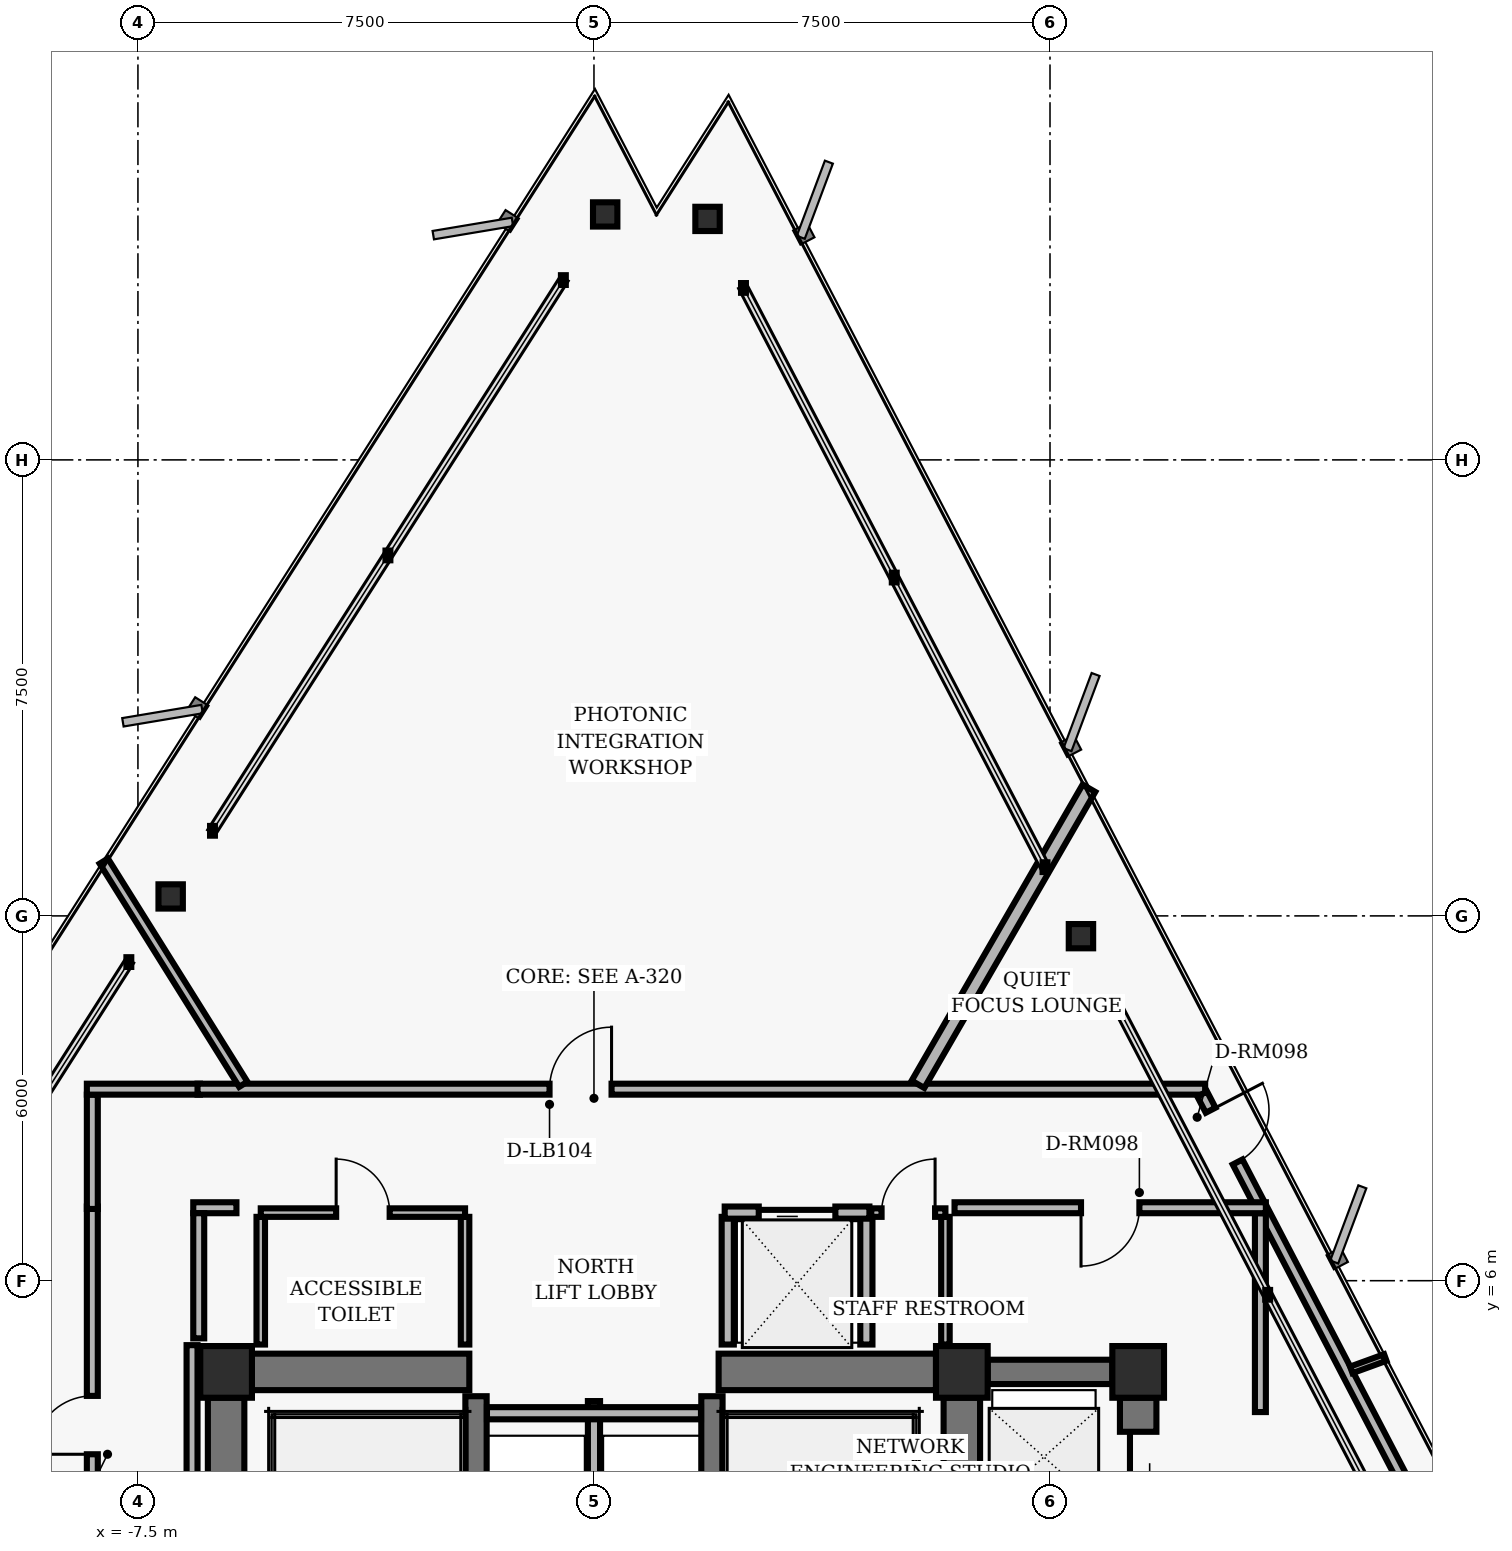
"""IFC4 building model, lengths in metres.
Left out: names, types, materials, properties, quantities, classifications, styles, units other than length and angle.
Written with IfcOpenShell. Run it as: python <this file> out.ifc"""

import sys

from ifc_helpers import new_model, si_unit, direction, frame, frame_2d, origin, origin_2d, place, context, subcontext, project, spatial, rectangle, hollow_rectangle, i_section, extrude, element, fill, save


model = new_model("IFC4")
c1 = context("Model", 3, precision=1e-05, world=origin(), true_north=direction((0.0, 1.0)))
c2 = subcontext(c1, "Body", "Model", "MODEL_VIEW")
j1 = project(units=[si_unit("LENGTHUNIT", "METRE"), si_unit("PLANEANGLEUNIT", "RADIAN")], contexts=[c1])
p1 = place(None, origin())
s1 = spatial("IfcSite", under=j1, at=p1, CompositionType="ELEMENT")
p2 = place(p1, origin())
s2 = spatial("IfcBuilding", under=s1, at=p2, CompositionType="ELEMENT")
p3 = place(p2, frame((0.0, 0.0, 138.08)))
s3 = spatial("IfcBuildingStorey", under=s2, at=p3, CompositionType="ELEMENT", Elevation=138.08)
for number, where, z_axis, x_axis in (
    (1, (-6.05, 4.5, 0.0), (0.0, 0.0, 1.0), (1.0, 0.0, 0.0)),
    (2, (6.05, 4.5, 0.0), (0.0, 0.0, 1.0), (1.0, 0.0, 0.0)),
    (3, (8.95, 4.5, 0.0), (0.0, 0.0, 1.0), (1.0, 0.0, 0.0)),
):
    element("IfcColumn", number, at=place(p3, frame(where, z_axis=z_axis, x_axis=x_axis)), inside=s3, PredefinedType="COLUMN", context=c2, shape_type="SweptSolid", body=[
        extrude(hollow_rectangle(XDim=0.85, YDim=0.85, WallThickness=0.055, InnerFilletRadius=0.02, OuterFilletRadius=0.04, at=origin_2d()), origin(), (0.0, 0.0, 1.0), 3.04),
    ])
for number, where, z_axis, x_axis in (
    (4, (-6.05, 0.425, 0.0), (0.0, 0.0, 1.0), (0.0, 1.0, 0.0)),
    (5, (6.05, 0.425, 0.0), (0.0, 0.0, 1.0), (0.0, 1.0, 0.0)),
):
    element("IfcWall", number, at=place(p3, frame(where, z_axis=z_axis, x_axis=x_axis)), inside=s3, PredefinedType="SHEAR", context=c2, shape_type="SweptSolid", body=[
        extrude(rectangle(XDim=3.65, YDim=0.6, at=frame_2d((1.825, 0.0))), origin(), (0.0, 0.0, 1.0), 2.788),
    ])
for number, where, z_axis, x_axis in (
    (6, (-1.94, -4.1, 0.0), (0.0, 0.0, 1.0), (0.0, 1.0, 0.0)),
    (7, (1.94, -4.1, 0.0), (0.0, 0.0, 1.0), (0.0, 1.0, 0.0)),
):
    element("IfcWall", number, at=place(p3, frame(where, z_axis=z_axis, x_axis=x_axis)), inside=s3, PredefinedType="SHEAR", context=c2, shape_type="SweptSolid", body=[
        extrude(rectangle(XDim=8.2, YDim=0.35, at=frame_2d((4.1, 0.0))), origin(), (0.0, 0.0, 1.0), 2.788),
    ])
for number, where, z_axis, x_axis in (
    (8, (-5.625, 4.5, 0.0), (0.0, 0.0, 1.0), (1.0, 0.0, 0.0)),
    (9, (2.05, 4.5, 0.0), (0.0, 0.0, 1.0), (1.0, 0.0, 0.0)),
):
    element("IfcWall", number, at=place(p3, frame(where, z_axis=z_axis, x_axis=x_axis)), inside=s3, PredefinedType="SHEAR", context=c2, shape_type="SweptSolid", body=[
        extrude(rectangle(XDim=3.575, YDim=0.6, at=frame_2d((1.788, 0.0))), origin(), (0.0, 0.0, 1.0), 2.788),
    ])
p4 = place(p3, frame((8.95, -3.875, 0.0), z_axis=(0.0, 0.0, 1.0), x_axis=(0.0, 1.0, 0.0)))
e10 = element("IfcWall", 10, at=p4, inside=s3, PredefinedType="SHEAR", context=c2, shape_type="SweptSolid", body=[
    extrude(rectangle(XDim=7.95, YDim=0.6, at=frame_2d((3.975, 0.0))), origin(), (0.0, 0.0, 1.0), 2.788),
])
p5 = place(p4, frame((0.55, 0.0, 0.0)))
e11 = element("IfcOpeningElement", 11, at=p5, cuts=e10, PredefinedType="OPENING", context=c2, shape_type="SweptSolid", body=[
    extrude(rectangle(XDim=1.06, YDim=2.04, at=frame_2d((0.53, 1.02))), frame((0.0, 0.31, 0.0), z_axis=(0.0, -1.0, 0.0), x_axis=(1.0, 0.0, 0.0)), (0.0, 0.0, 1.0), 0.62),
])
p6 = place(p4, frame((3.445, 0.0, 0.0)))
e12 = element("IfcOpeningElement", 12, at=p6, cuts=e10, PredefinedType="OPENING", context=c2, shape_type="SweptSolid", body=[
    extrude(rectangle(XDim=1.06, YDim=2.04, at=frame_2d((0.53, 1.02))), frame((0.0, 0.31, 0.0), z_axis=(0.0, -1.0, 0.0), x_axis=(1.0, 0.0, 0.0)), (0.0, 0.0, 1.0), 0.62),
])
p7 = place(p4, frame((6.33, 0.0, 0.0)))
e13 = element("IfcOpeningElement", 13, at=p7, cuts=e10, PredefinedType="OPENING", context=c2, shape_type="SweptSolid", body=[
    extrude(rectangle(XDim=1.06, YDim=2.04, at=frame_2d((0.53, 1.02))), frame((0.0, 0.31, 0.0), z_axis=(0.0, -1.0, 0.0), x_axis=(1.0, 0.0, 0.0)), (0.0, 0.0, 1.0), 0.62),
])
p8 = place(p3, frame((6.475, 4.5, 0.0), z_axis=(0.0, 0.0, 1.0), x_axis=(1.0, 0.0, 0.0)))
e14 = element("IfcWall", 14, at=p8, inside=s3, PredefinedType="SHEAR", context=c2, shape_type="SweptSolid", body=[
    extrude(rectangle(XDim=2.05, YDim=0.4, at=frame_2d((1.025, 0.0))), origin(), (0.0, 0.0, 1.0), 2.788),
])
for number, where, z_axis, x_axis in (
    (15, (8.009, 11.666, 0.0), (0.0, 0.0, 1.0), (1.0, 0.0, 0.0)),
    (16, (1.868, 23.463, 0.0), (0.0, 0.0, 1.0), (1.0, 0.0, 0.0)),
    (17, (0.184, 23.537, 0.0), (0.0, 0.0, 1.0), (1.0, 0.0, 0.0)),
    (18, (-6.962, 12.32, 0.0), (0.0, 0.0, 1.0), (1.0, 0.0, 0.0)),
):
    element("IfcColumn", number, at=place(p3, frame(where, z_axis=z_axis, x_axis=x_axis)), inside=s3, PredefinedType="COLUMN", context=c2, shape_type="SweptSolid", body=[
        extrude(i_section(OverallWidth=0.401, OverallDepth=0.399, WebThickness=0.025, FlangeThickness=0.04, FilletRadius=0.018, at=origin_2d()), origin(), (0.0, 0.0, 1.0), 3.04),
    ])
p9 = place(p3, frame((0.0, 1.25, 0.0), z_axis=(0.0, 0.0, 1.0), x_axis=(0.0, 1.0, 0.0)))
e19 = element("IfcWall", 19, at=p9, inside=s3, PredefinedType="PARTITIONING", context=c2, shape_type="SweptSolid", body=[
    extrude(rectangle(XDim=2.77, YDim=0.2, at=frame_2d((1.385, 0.0))), origin(), (0.0, 0.0, 1.0), 2.763),
])
p10 = place(p3, frame((-1.76, 3.82, 0.0), z_axis=(0.0, 0.0, 1.0), x_axis=(1.0, 0.0, 0.0)))
e20 = element("IfcWall", 20, at=p10, inside=s3, PredefinedType="PARTITIONING", context=c2, shape_type="SweptSolid", body=[
    extrude(rectangle(XDim=3.52, YDim=0.2, at=frame_2d((1.76, 0.0))), origin(), (0.0, 0.0, 1.0), 2.763),
])
for number, where, z_axis, x_axis in (
    (21, (2.2, 4.95, 0.0), (0.0, 0.0, 1.0), (0.0, 1.0, 0.0)),
    (22, (4.48, 4.95, 0.0), (0.0, 0.0, 1.0), (0.0, 1.0, 0.0)),
):
    element("IfcWall", number, at=place(p3, frame(where, z_axis=z_axis, x_axis=x_axis)), inside=s3, PredefinedType="PARTITIONING", context=c2, shape_type="SweptSolid", body=[
        extrude(rectangle(XDim=2.1, YDim=0.2, at=frame_2d((1.05, 0.0))), origin(), (0.0, 0.0, 1.0), 2.763),
    ])
p11 = place(p3, frame((2.15, 7.12, 0.0), z_axis=(0.0, 0.0, 1.0), x_axis=(1.0, 0.0, 0.0)))
e23 = element("IfcWall", 23, at=p11, inside=s3, PredefinedType="PARTITIONING", context=c2, shape_type="SweptSolid", body=[
    extrude(rectangle(XDim=2.38, YDim=0.2, at=frame_2d((1.19, 0.0))), origin(), (0.0, 0.0, 1.0), 2.763),
])
p12 = place(p11, frame((0.56, 0.0, 0.0)))
e24 = element("IfcOpeningElement", 24, at=p12, cuts=e23, PredefinedType="OPENING", context=c2, shape_type="SweptSolid", body=[
    extrude(rectangle(XDim=1.26, YDim=2.06, at=frame_2d((0.63, 1.03))), frame((0.0, 0.11, 0.0), z_axis=(0.0, -1.0, 0.0), x_axis=(1.0, 0.0, 0.0)), (0.0, 0.0, 1.0), 0.22),
])
for number, where, z_axis, x_axis in (
    (25, (-5.48, 4.95, 0.0), (0.0, 0.0, 1.0), (0.0, 1.0, 0.0)),
    (26, (-2.12, 4.95, 0.0), (0.0, 0.0, 1.0), (0.0, 1.0, 0.0)),
):
    element("IfcWall", number, at=place(p3, frame(where, z_axis=z_axis, x_axis=x_axis)), inside=s3, PredefinedType="PARTITIONING", context=c2, shape_type="SweptSolid", body=[
        extrude(rectangle(XDim=2.1, YDim=0.14, at=frame_2d((1.05, 0.0))), origin(), (0.0, 0.0, 1.0), 2.763),
    ])
p13 = place(p3, frame((-5.48, 7.12, 0.0), z_axis=(0.0, 0.0, 1.0), x_axis=(1.0, 0.0, 0.0)))
e27 = element("IfcWall", 27, at=p13, inside=s3, PredefinedType="PARTITIONING", context=c2, shape_type="SweptSolid", body=[
    extrude(rectangle(XDim=3.36, YDim=0.14, at=frame_2d((1.68, 0.0))), origin(), (0.0, 0.0, 1.0), 2.33),
])
p14 = place(p13, frame((1.24, 0.0, 0.0)))
e28 = element("IfcOpeningElement", 28, at=p14, cuts=e27, PredefinedType="OPENING", context=c2, shape_type="SweptSolid", body=[
    extrude(rectangle(XDim=0.88, YDim=2.02, at=frame_2d((0.44, 1.01))), frame((0.0, 0.08, 0.0), z_axis=(0.0, -1.0, 0.0), x_axis=(1.0, 0.0, 0.0)), (0.0, 0.0, 1.0), 0.16),
])
p15 = place(p3, frame((5.78, 4.95, 0.0), z_axis=(0.0, 0.0, 1.0), x_axis=(0.0, 1.0, 0.0)))
e29 = element("IfcWall", 29, at=p15, inside=s3, PredefinedType="PARTITIONING", context=c2, shape_type="SweptSolid", body=[
    extrude(rectangle(XDim=2.1, YDim=0.14, at=frame_2d((1.05, 0.0))), origin(), (0.0, 0.0, 1.0), 2.763),
])
p16 = place(p3, frame((4.56, 7.12, 0.0), z_axis=(0.0, 0.0, 1.0), x_axis=(1.0, 0.0, 0.0)))
e30 = element("IfcWall", 30, at=p16, inside=s3, PredefinedType="PARTITIONING", context=c2, shape_type="SweptSolid", body=[
    extrude(rectangle(XDim=1.22, YDim=0.14, at=frame_2d((0.61, 0.0))), origin(), (0.0, 0.0, 1.0), 2.763),
])
p17 = place(p16, frame((0.17, 0.0, 0.0)))
e31 = element("IfcOpeningElement", 31, at=p17, cuts=e30, PredefinedType="OPENING", context=c2, shape_type="SweptSolid", body=[
    extrude(rectangle(XDim=0.88, YDim=2.02, at=frame_2d((0.44, 1.01))), frame((0.0, 0.08, 0.0), z_axis=(0.0, -1.0, 0.0), x_axis=(1.0, 0.0, 0.0)), (0.0, 0.0, 1.0), 0.16),
])
p18 = place(p3, frame((-8.25, -7.22, 0.0), z_axis=(0.0, 0.0, 1.0), x_axis=(0.0, 1.0, 0.0)))
e32 = element("IfcWall", 32, at=p18, inside=s3, PredefinedType="PARTITIONING", context=c2, shape_type="SweptSolid", body=[
    extrude(rectangle(XDim=14.44, YDim=0.18, at=frame_2d((7.22, 0.0))), origin(), (0.0, 0.0, 1.0), 2.763),
])
p19 = place(p18, frame((3.406, 0.0, 0.0)))
e33 = element("IfcOpeningElement", 33, at=p19, cuts=e32, PredefinedType="OPENING", context=c2, shape_type="SweptSolid", body=[
    extrude(rectangle(XDim=0.96, YDim=2.02, at=frame_2d((0.48, 1.01))), frame((0.0, 0.1, 0.0), z_axis=(0.0, -1.0, 0.0), x_axis=(1.0, 0.0, 0.0)), (0.0, 0.0, 1.0), 0.2),
])
p20 = place(p18, frame((10.365, 0.0, 0.0)))
e34 = element("IfcOpeningElement", 34, at=p20, cuts=e32, PredefinedType="OPENING", context=c2, shape_type="SweptSolid", body=[
    extrude(rectangle(XDim=0.96, YDim=2.02, at=frame_2d((0.48, 1.01))), frame((0.0, 0.1, 0.0), z_axis=(0.0, -1.0, 0.0), x_axis=(1.0, 0.0, 0.0)), (0.0, 0.0, 1.0), 0.2),
])
p21 = place(p3, frame((-8.25, 7.18, 0.0), z_axis=(0.0, 0.0, 1.0), x_axis=(0.0, 1.0, 0.0)))
e35 = element("IfcWall", 35, at=p21, inside=s3, PredefinedType="PARTITIONING", context=c2, shape_type="SweptSolid", body=[
    extrude(rectangle(XDim=1.88, YDim=0.18, at=frame_2d((0.94, 0.0))), origin(), (0.0, 0.0, 1.0), 2.763),
])
p22 = place(p3, frame((-8.34, 9.15, 0.0), z_axis=(0.0, 0.0, 1.0), x_axis=(1.0, 0.0, 0.0)))
e36 = element("IfcWall", 36, at=p22, inside=s3, PredefinedType="PARTITIONING", context=c2, shape_type="SweptSolid", body=[
    extrude(rectangle(XDim=1.86, YDim=0.18, at=frame_2d((0.93, 0.0))), origin(), (0.0, 0.0, 1.0), 2.763),
])
p23 = place(p3, frame((-6.52, 9.15, 0.0), z_axis=(0.0, 0.0, 1.0), x_axis=(1.0, 0.0, 0.0)))
e37 = element("IfcWall", 37, at=p23, inside=s3, PredefinedType="PARTITIONING", context=c2, shape_type="SweptSolid", body=[
    extrude(rectangle(XDim=16.572, YDim=0.18, at=frame_2d((8.286, 0.0))), origin(), (0.0, 0.0, 1.0), 2.33),
])
p24 = place(p23, frame((5.789, 0.0, 0.0)))
e38 = element("IfcOpeningElement", 38, at=p24, cuts=e37, PredefinedType="OPENING", context=c2, shape_type="SweptSolid", body=[
    extrude(rectangle(XDim=1.02, YDim=2.02, at=frame_2d((0.51, 1.01))), frame((0.0, 0.1, 0.0), z_axis=(0.0, -1.0, 0.0), x_axis=(1.0, 0.0, 0.0)), (0.0, 0.0, 1.0), 0.2),
])
p25 = place(p3, frame((10.003, 9.07, 0.0), z_axis=(0.0, 0.0, 1.0), x_axis=(0.461740291408, -0.887015165198, 0.0)))
e39 = element("IfcWall", 39, at=p25, inside=s3, PredefinedType="PARTITIONING", context=c2, shape_type="SweptSolid", body=[
    extrude(rectangle(XDim=9.976, YDim=0.18, at=frame_2d((4.988, 0.0))), origin(), (0.0, 0.0, 1.0), 2.763),
])
p26 = place(p25, frame((0.301, 0.0, 0.0)))
e40 = element("IfcOpeningElement", 40, at=p26, cuts=e39, PredefinedType="OPENING", context=c2, shape_type="SweptSolid", body=[
    extrude(rectangle(XDim=0.96, YDim=2.02, at=frame_2d((0.48, 1.01))), frame((0.0, 0.1, 0.0), z_axis=(0.0, -1.0, 0.0), x_axis=(1.0, 0.0, 0.0)), (0.0, 0.0, 1.0), 0.2),
])
p27 = place(p3, frame((10.96, 3.84, 0.0), z_axis=(0.0, 0.0, 1.0), x_axis=(0.0, 1.0, 0.0)))
e41 = element("IfcWall", 41, at=p27, inside=s3, PredefinedType="PARTITIONING", context=c2, shape_type="SweptSolid", body=[
    extrude(rectangle(XDim=3.271, YDim=0.18, at=frame_2d((1.635, 0.0))), origin(), (0.0, 0.0, 1.0), 2.763),
])
p28 = place(p3, frame((11.05, 7.2, 0.0), z_axis=(0.0, 0.0, 1.0), x_axis=(-1.0, 0.0, 0.0)))
e42 = element("IfcWall", 42, at=p28, inside=s3, PredefinedType="PARTITIONING", context=c2, shape_type="SweptSolid", body=[
    extrude(rectangle(XDim=5.12, YDim=0.18, at=frame_2d((2.56, 0.0))), origin(), (0.0, 0.0, 1.0), 2.763),
])
p29 = place(p28, frame((2.08, 0.0, 0.0)))
e43 = element("IfcOpeningElement", 43, at=p29, cuts=e42, PredefinedType="OPENING", context=c2, shape_type="SweptSolid", body=[
    extrude(rectangle(XDim=0.96, YDim=2.02, at=frame_2d((0.48, 1.01))), frame((0.0, 0.1, 0.0), z_axis=(0.0, -1.0, 0.0), x_axis=(1.0, 0.0, 0.0)), (0.0, 0.0, 1.0), 0.2),
])
p30 = place(p3, frame((-5.88, 7.2, 0.0), z_axis=(0.0, 0.0, 1.0), x_axis=(-1.0, 0.0, 0.0)))
e44 = element("IfcWall", 44, at=p30, inside=s3, PredefinedType="PARTITIONING", context=c2, shape_type="SweptSolid", body=[
    extrude(rectangle(XDim=0.71, YDim=0.18, at=frame_2d((0.355, 0.0))), origin(), (0.0, 0.0, 1.0), 2.33),
])
p31 = place(p3, frame((-6.5, 7.11, 0.0), z_axis=(0.0, 0.0, 1.0), x_axis=(0.0, -1.0, 0.0)))
e45 = element("IfcWall", 45, at=p31, inside=s3, PredefinedType="PARTITIONING", context=c2, shape_type="SweptSolid", body=[
    extrude(rectangle(XDim=2.058, YDim=0.18, at=frame_2d((1.029, 0.0))), origin(), (0.0, 0.0, 1.0), 2.132),
])
p32 = place(p3, frame((-6.61, 4.94, 0.0), z_axis=(0.0, 0.0, 1.0), x_axis=(0.0, -1.0, 0.0)))
e46 = element("IfcWall", 46, at=p32, inside=s3, PredefinedType="PARTITIONING", context=c2, shape_type="SweptSolid", body=[
    extrude(rectangle(XDim=9.46, YDim=0.18, at=frame_2d((4.73, 0.0))), origin(), (0.0, 0.0, 1.0), 2.763),
])
p33 = place(p3, frame((12.455, 4.533, 0.0), z_axis=(0.0, 0.0, 1.0), x_axis=(0.93962558955, 0.342204254011, 0.0)))
e47 = element("IfcWall", 47, at=p33, inside=s3, PredefinedType="MOVABLE", context=c2, shape_type="SweptSolid", body=[
    extrude(rectangle(XDim=0.595, YDim=0.115, at=frame_2d((0.297, 0.0))), origin(), (0.0, 0.0, 1.0), 2.763),
])
p34 = place(p3, frame((5.329, 9.23, 0.0), z_axis=(0.0, 0.0, 1.0), x_axis=(0.500024387096, 0.86601132343, 0.0)))
e48 = element("IfcWall", 48, at=p34, inside=s3, PredefinedType="PARTITIONING", context=c2, shape_type="SweptSolid", body=[
    extrude(rectangle(XDim=5.623, YDim=0.24, at=frame_2d((2.812, 0.0))), origin(), (0.0, 0.0, 1.0), 2.763),
])
p35 = place(p3, frame((-5.768, 9.23, 0.0), z_axis=(0.0, 0.0, 1.0), x_axis=(-0.529887412725, 0.848067998356, 0.0)))
e49 = element("IfcWall", 49, at=p35, inside=s3, PredefinedType="PARTITIONING", context=c2, shape_type="SweptSolid", body=[
    extrude(rectangle(XDim=4.329, YDim=0.16, at=frame_2d((2.165, 0.0))), origin(), (0.0, 0.0, 1.0), 2.763),
])
p36 = place(p12, origin())
e50 = element("IfcDoor", 50, at=p36, inside=s3, OperationType="SLIDING_TO_LEFT", PredefinedType="DOOR", context=c2, shape_type="SweptSolid", body=[
    extrude(rectangle(XDim=1.26, YDim=2.06, at=frame_2d((0.63, 1.03))), frame((0.0, 0.025, 0.0), z_axis=(0.0, -1.0, 0.0), x_axis=(1.0, 0.0, 0.0)), (0.0, 0.0, 1.0), 0.05),
])
fill(e24, e50)
p37 = place(p14, origin())
e51 = element("IfcDoor", 51, at=p37, inside=s3, OperationType="SINGLE_SWING_LEFT", PredefinedType="DOOR", context=c2, shape_type="SweptSolid", body=[
    extrude(rectangle(XDim=0.88, YDim=2.02, at=frame_2d((0.44, 1.01))), frame((0.0, 0.025, 0.0), z_axis=(0.0, -1.0, 0.0), x_axis=(1.0, 0.0, 0.0)), (0.0, 0.0, 1.0), 0.05),
])
fill(e28, e51)
p38 = place(p17, origin())
e52 = element("IfcDoor", 52, at=p38, inside=s3, OperationType="SINGLE_SWING_RIGHT", PredefinedType="DOOR", context=c2, shape_type="SweptSolid", body=[
    extrude(rectangle(XDim=0.88, YDim=2.02, at=frame_2d((0.44, 1.01))), frame((0.0, 0.025, 0.0), z_axis=(0.0, -1.0, 0.0), x_axis=(1.0, 0.0, 0.0)), (0.0, 0.0, 1.0), 0.05),
])
fill(e31, e52)
p39 = place(p7, origin())
e53 = element("IfcDoor", 53, at=p39, inside=s3, OperationType="SLIDING_TO_LEFT", PredefinedType="DOOR", context=c2, shape_type="SweptSolid", body=[
    extrude(rectangle(XDim=1.06, YDim=2.04, at=frame_2d((0.53, 1.02))), frame((0.0, 0.025, 0.0), z_axis=(0.0, -1.0, 0.0), x_axis=(1.0, 0.0, 0.0)), (0.0, 0.0, 1.0), 0.05),
])
fill(e13, e53)
p40 = place(p29, origin())
e54 = element("IfcDoor", 54, at=p40, inside=s3, OperationType="SINGLE_SWING_RIGHT", PredefinedType="DOOR", context=c2, shape_type="SweptSolid", body=[
    extrude(rectangle(XDim=0.96, YDim=2.02, at=frame_2d((0.48, 1.01))), frame((0.0, 0.025, 0.0), z_axis=(0.0, -1.0, 0.0), x_axis=(1.0, 0.0, 0.0)), (0.0, 0.0, 1.0), 0.05),
])
fill(e43, e54)
p41 = place(p26, origin())
e55 = element("IfcDoor", 55, at=p41, inside=s3, OperationType="SINGLE_SWING_LEFT", PredefinedType="DOOR", context=c2, shape_type="SweptSolid", body=[
    extrude(rectangle(XDim=0.96, YDim=2.02, at=frame_2d((0.48, 1.01))), frame((0.0, 0.025, 0.0), z_axis=(0.0, -1.0, 0.0), x_axis=(1.0, 0.0, 0.0)), (0.0, 0.0, 1.0), 0.05),
])
fill(e40, e55)
p42 = place(p24, origin())
e56 = element("IfcDoor", 56, at=p42, inside=s3, OperationType="SINGLE_SWING_RIGHT", PredefinedType="DOOR", context=c2, shape_type="SweptSolid", body=[
    extrude(rectangle(XDim=1.02, YDim=2.02, at=frame_2d((0.51, 1.01))), frame((0.0, 0.025, 0.0), z_axis=(0.0, -1.0, 0.0), x_axis=(1.0, 0.0, 0.0)), (0.0, 0.0, 1.0), 0.05),
])
fill(e38, e56)
p43 = place(p20, origin())
e57 = element("IfcDoor", 57, at=p43, inside=s3, OperationType="SINGLE_SWING_LEFT", PredefinedType="DOOR", context=c2, shape_type="SweptSolid", body=[
    extrude(rectangle(XDim=0.96, YDim=2.02, at=frame_2d((0.48, 1.01))), frame((0.0, 0.025, 0.0), z_axis=(0.0, -1.0, 0.0), x_axis=(1.0, 0.0, 0.0)), (0.0, 0.0, 1.0), 0.05),
])
fill(e34, e57)
save(model, sys.argv[1])
